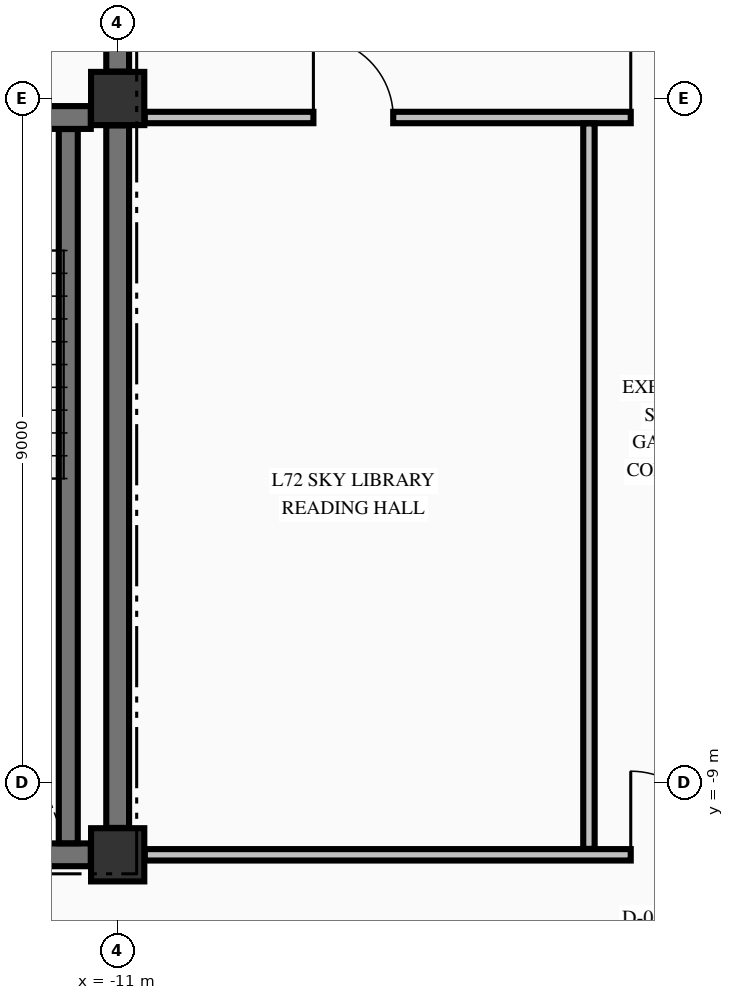
"""IFC4 building model, lengths in metres.
Left out: names, types, materials, properties, quantities, classifications, styles, units other than length and angle.
Written with IfcOpenShell. Run it as: python <this file> out.ifc"""

import sys

from ifc_helpers import new_model, si_unit, direction, frame, frame_2d, origin, origin_2d, place, context, subcontext, project, spatial, rectangle, extrude, element, fill, save


model = new_model("IFC4")
c1 = context("Model", 3, precision=1e-05, world=origin(), true_north=direction((0.0, 1.0)))
c2 = subcontext(c1, "Body", "Model", "MODEL_VIEW")
j1 = project(units=[si_unit("LENGTHUNIT", "METRE"), si_unit("PLANEANGLEUNIT", "RADIAN")], contexts=[c1])
p1 = place(None, origin())
s1 = spatial("IfcSite", under=j1, at=p1, CompositionType="ELEMENT")
p2 = place(p1, origin())
s2 = spatial("IfcBuilding", under=s1, at=p2, CompositionType="ELEMENT")
p3 = place(p2, frame((0.0, 0.0, 270.58)))
s3 = spatial("IfcBuildingStorey", under=s2, at=p3, CompositionType="ELEMENT", Elevation=270.58)
for number, where, z_axis, x_axis in (
    (1, (-11.0, -9.95, -0.325), (0.0, 0.0, 1.0), (1.0, 0.0, 0.0)),
    (2, (-11.0, 0.0, -0.325), (0.0, 0.0, 1.0), (1.0, 0.0, 0.0)),
):
    element("IfcColumn", number, at=place(p3, frame(where, z_axis=z_axis, x_axis=x_axis)), inside=s3, PredefinedType="COLUMN", context=c2, shape_type="SweptSolid", body=[
        extrude(rectangle(XDim=0.7, YDim=0.7, at=origin_2d()), origin(), (0.0, 0.0, 1.0), 3.815),
    ])
p4 = place(p3, frame((-14.7, -9.95, 0.0), z_axis=(0.0, 0.0, 1.0), x_axis=(1.0, 0.0, 0.0)))
e3 = element("IfcWall", 3, at=p4, inside=s3, PredefinedType="SHEAR", context=c2, shape_type="SweptSolid", body=[
    extrude(rectangle(XDim=3.346, YDim=0.3, at=frame_2d((1.673, 0.0))), origin(), (0.0, 0.0, 1.0), 3.49),
])
p5 = place(p3, frame((-19.646, -0.25, 0.0), z_axis=(0.0, 0.0, 1.0), x_axis=(1.0, 0.0, 0.0)))
e4 = element("IfcWall", 4, at=p5, inside=s3, PredefinedType="SHEAR", context=c2, shape_type="SweptSolid", body=[
    extrude(rectangle(XDim=8.292, YDim=0.3, at=frame_2d((4.146, 0.0))), origin(), (0.0, 0.0, 1.0), 3.49),
])
p6 = place(p5, frame((5.946, 0.0, 0.0)))
e5 = element("IfcOpeningElement", 5, at=p6, cuts=e4, PredefinedType="OPENING", context=c2, shape_type="SweptSolid", body=[
    extrude(rectangle(XDim=1.1, YDim=2.15, at=frame_2d((0.55, 1.075))), frame((0.0, 0.16, 0.0), z_axis=(0.0, -1.0, 0.0), x_axis=(1.0, 0.0, 0.0)), (0.0, 0.0, 1.0), 0.32),
])
p7 = place(p3, frame((-10.644, -9.95, 0.0), z_axis=(0.0, 0.0, 1.0), x_axis=(1.0, 0.0, 0.0)))
e6 = element("IfcWall", 6, at=p7, inside=s3, PredefinedType="PARTITIONING", context=c2, shape_type="SweptSolid", body=[
    extrude(rectangle(XDim=21.288, YDim=0.15, at=frame_2d((10.644, 0.0))), origin(), (0.0, 0.0, 1.0), 3.49),
])
p8 = place(p7, frame((6.394, 0.0, 0.0)))
e7 = element("IfcOpeningElement", 7, at=p8, cuts=e6, PredefinedType="OPENING", context=c2, shape_type="SweptSolid", body=[
    extrude(rectangle(XDim=1.1, YDim=2.15, at=frame_2d((0.55, 1.075))), frame((0.0, 0.085, 0.0), z_axis=(0.0, -1.0, 0.0), x_axis=(1.0, 0.0, 0.0)), (0.0, 0.0, 1.0), 0.17),
])
p9 = place(p7, frame((13.769, 0.0, 0.0)))
e8 = element("IfcOpeningElement", 8, at=p9, cuts=e6, PredefinedType="OPENING", context=c2, shape_type="SweptSolid", body=[
    extrude(rectangle(XDim=0.95, YDim=2.15, at=frame_2d((0.475, 1.075))), frame((0.0, 0.085, 0.0), z_axis=(0.0, -1.0, 0.0), x_axis=(1.0, 0.0, 0.0)), (0.0, 0.0, 1.0), 0.17),
])
p10 = place(p7, frame((17.994, 0.0, 0.0)))
e9 = element("IfcOpeningElement", 9, at=p10, cuts=e6, PredefinedType="OPENING", context=c2, shape_type="SweptSolid", body=[
    extrude(rectangle(XDim=0.9, YDim=2.15, at=frame_2d((0.45, 1.075))), frame((0.0, 0.085, 0.0), z_axis=(0.0, -1.0, 0.0), x_axis=(1.0, 0.0, 0.0)), (0.0, 0.0, 1.0), 0.17),
])
p11 = place(p3, frame((-10.644, -0.25, 0.0), z_axis=(0.0, 0.0, 1.0), x_axis=(1.0, 0.0, 0.0)))
e10 = element("IfcWall", 10, at=p11, inside=s3, PredefinedType="PARTITIONING", context=c2, shape_type="SweptSolid", body=[
    extrude(rectangle(XDim=21.288, YDim=0.15, at=frame_2d((10.644, 0.0))), origin(), (0.0, 0.0, 1.0), 3.49),
])
p12 = place(p11, frame((6.394, 0.0, 0.0)))
e11 = element("IfcOpeningElement", 11, at=p12, cuts=e10, PredefinedType="OPENING", context=c2, shape_type="SweptSolid", body=[
    extrude(rectangle(XDim=1.1, YDim=2.15, at=frame_2d((0.55, 1.075))), frame((0.0, 0.085, 0.0), z_axis=(0.0, -1.0, 0.0), x_axis=(1.0, 0.0, 0.0)), (0.0, 0.0, 1.0), 0.17),
])
p13 = place(p11, frame((2.219, 0.0, 0.0)))
e12 = element("IfcOpeningElement", 12, at=p13, cuts=e10, PredefinedType="OPENING", context=c2, shape_type="SweptSolid", body=[
    extrude(rectangle(XDim=1.05, YDim=2.15, at=frame_2d((0.525, 1.075))), frame((0.0, 0.085, 0.0), z_axis=(0.0, -1.0, 0.0), x_axis=(1.0, 0.0, 0.0)), (0.0, 0.0, 1.0), 0.17),
])
p14 = place(p11, frame((14.369, 0.0, 0.0)))
e13 = element("IfcOpeningElement", 13, at=p14, cuts=e10, PredefinedType="OPENING", context=c2, shape_type="SweptSolid", body=[
    extrude(rectangle(XDim=0.95, YDim=2.15, at=frame_2d((0.475, 1.075))), frame((0.0, 0.085, 0.0), z_axis=(0.0, -1.0, 0.0), x_axis=(1.0, 0.0, 0.0)), (0.0, 0.0, 1.0), 0.17),
])
p15 = place(p3, frame((-11.65, -9.798, 0.0), z_axis=(0.0, 0.0, 1.0), x_axis=(0.0, 1.0, 0.0)))
e14 = element("IfcWall", 14, at=p15, inside=s3, PredefinedType="SOLIDWALL", context=c2, shape_type="SweptSolid", body=[
    extrude(rectangle(XDim=9.396, YDim=0.25, at=frame_2d((4.698, 0.0))), origin(), (0.0, 0.0, 1.0), 3.49),
])
p16 = place(p3, frame((-11.0, -9.596, 0.0), z_axis=(0.0, 0.0, 1.0), x_axis=(0.0, 1.0, 0.0)))
e15 = element("IfcWall", 15, at=p16, inside=s3, PredefinedType="SHEAR", context=c2, shape_type="SweptSolid", body=[
    extrude(rectangle(XDim=9.242, YDim=0.3, at=frame_2d((4.621, 0.0))), origin(), (0.0, 0.0, 1.0), 3.49),
])
p17 = place(p3, frame((-11.0, 0.354, 0.0), z_axis=(0.0, 0.0, 1.0), x_axis=(0.0, 1.0, 0.0)))
e16 = element("IfcWall", 16, at=p17, inside=s3, PredefinedType="SHEAR", context=c2, shape_type="SweptSolid", body=[
    extrude(rectangle(XDim=2.394, YDim=0.3, at=frame_2d((1.197, 0.0))), origin(), (0.0, 0.0, 1.0), 3.49),
])
p18 = place(p17, frame((0.746, 0.0, 0.0)))
e17 = element("IfcOpeningElement", 17, at=p18, cuts=e16, PredefinedType="OPENING", context=c2, shape_type="SweptSolid", body=[
    extrude(rectangle(XDim=1.1, YDim=2.15, at=frame_2d((0.55, 1.075))), frame((0.0, 0.16, 0.0), z_axis=(0.0, -1.0, 0.0), x_axis=(1.0, 0.0, 0.0)), (0.0, 0.0, 1.0), 0.32),
])
p19 = place(p3, frame((-4.8, -9.872, 0.0), z_axis=(0.0, 0.0, 1.0), x_axis=(0.0, 1.0, 0.0)))
e18 = element("IfcWall", 18, at=p19, inside=s3, PredefinedType="PARTITIONING", context=c2, shape_type="SweptSolid", body=[
    extrude(rectangle(XDim=9.544, YDim=0.15, at=frame_2d((4.772, 0.0))), origin(), (0.0, 0.0, 1.0), 3.49),
])
p20 = place(p8, origin())
e19 = element("IfcDoor", 19, at=p20, inside=s3, OperationType="SINGLE_SWING_LEFT", PredefinedType="DOOR", context=c2, shape_type="SweptSolid", body=[
    extrude(rectangle(XDim=1.1, YDim=2.15, at=frame_2d((0.55, 1.075))), frame((0.0, 0.025, 0.0), z_axis=(0.0, -1.0, 0.0), x_axis=(1.0, 0.0, 0.0)), (0.0, 0.0, 1.0), 0.05),
])
fill(e7, e19)
p21 = place(p12, origin())
e20 = element("IfcDoor", 20, at=p21, inside=s3, OperationType="SINGLE_SWING_LEFT", PredefinedType="DOOR", context=c2, shape_type="SweptSolid", body=[
    extrude(rectangle(XDim=1.1, YDim=2.15, at=frame_2d((0.55, 1.075))), frame((0.0, 0.025, 0.0), z_axis=(0.0, -1.0, 0.0), x_axis=(1.0, 0.0, 0.0)), (0.0, 0.0, 1.0), 0.05),
])
fill(e11, e20)
p22 = place(p13, origin())
e21 = element("IfcDoor", 21, at=p22, inside=s3, OperationType="SINGLE_SWING_LEFT", PredefinedType="DOOR", context=c2, shape_type="SweptSolid", body=[
    extrude(rectangle(XDim=1.05, YDim=2.15, at=frame_2d((0.525, 1.075))), frame((0.0, 0.025, 0.0), z_axis=(0.0, -1.0, 0.0), x_axis=(1.0, 0.0, 0.0)), (0.0, 0.0, 1.0), 0.05),
])
fill(e12, e21)
save(model, sys.argv[1])
